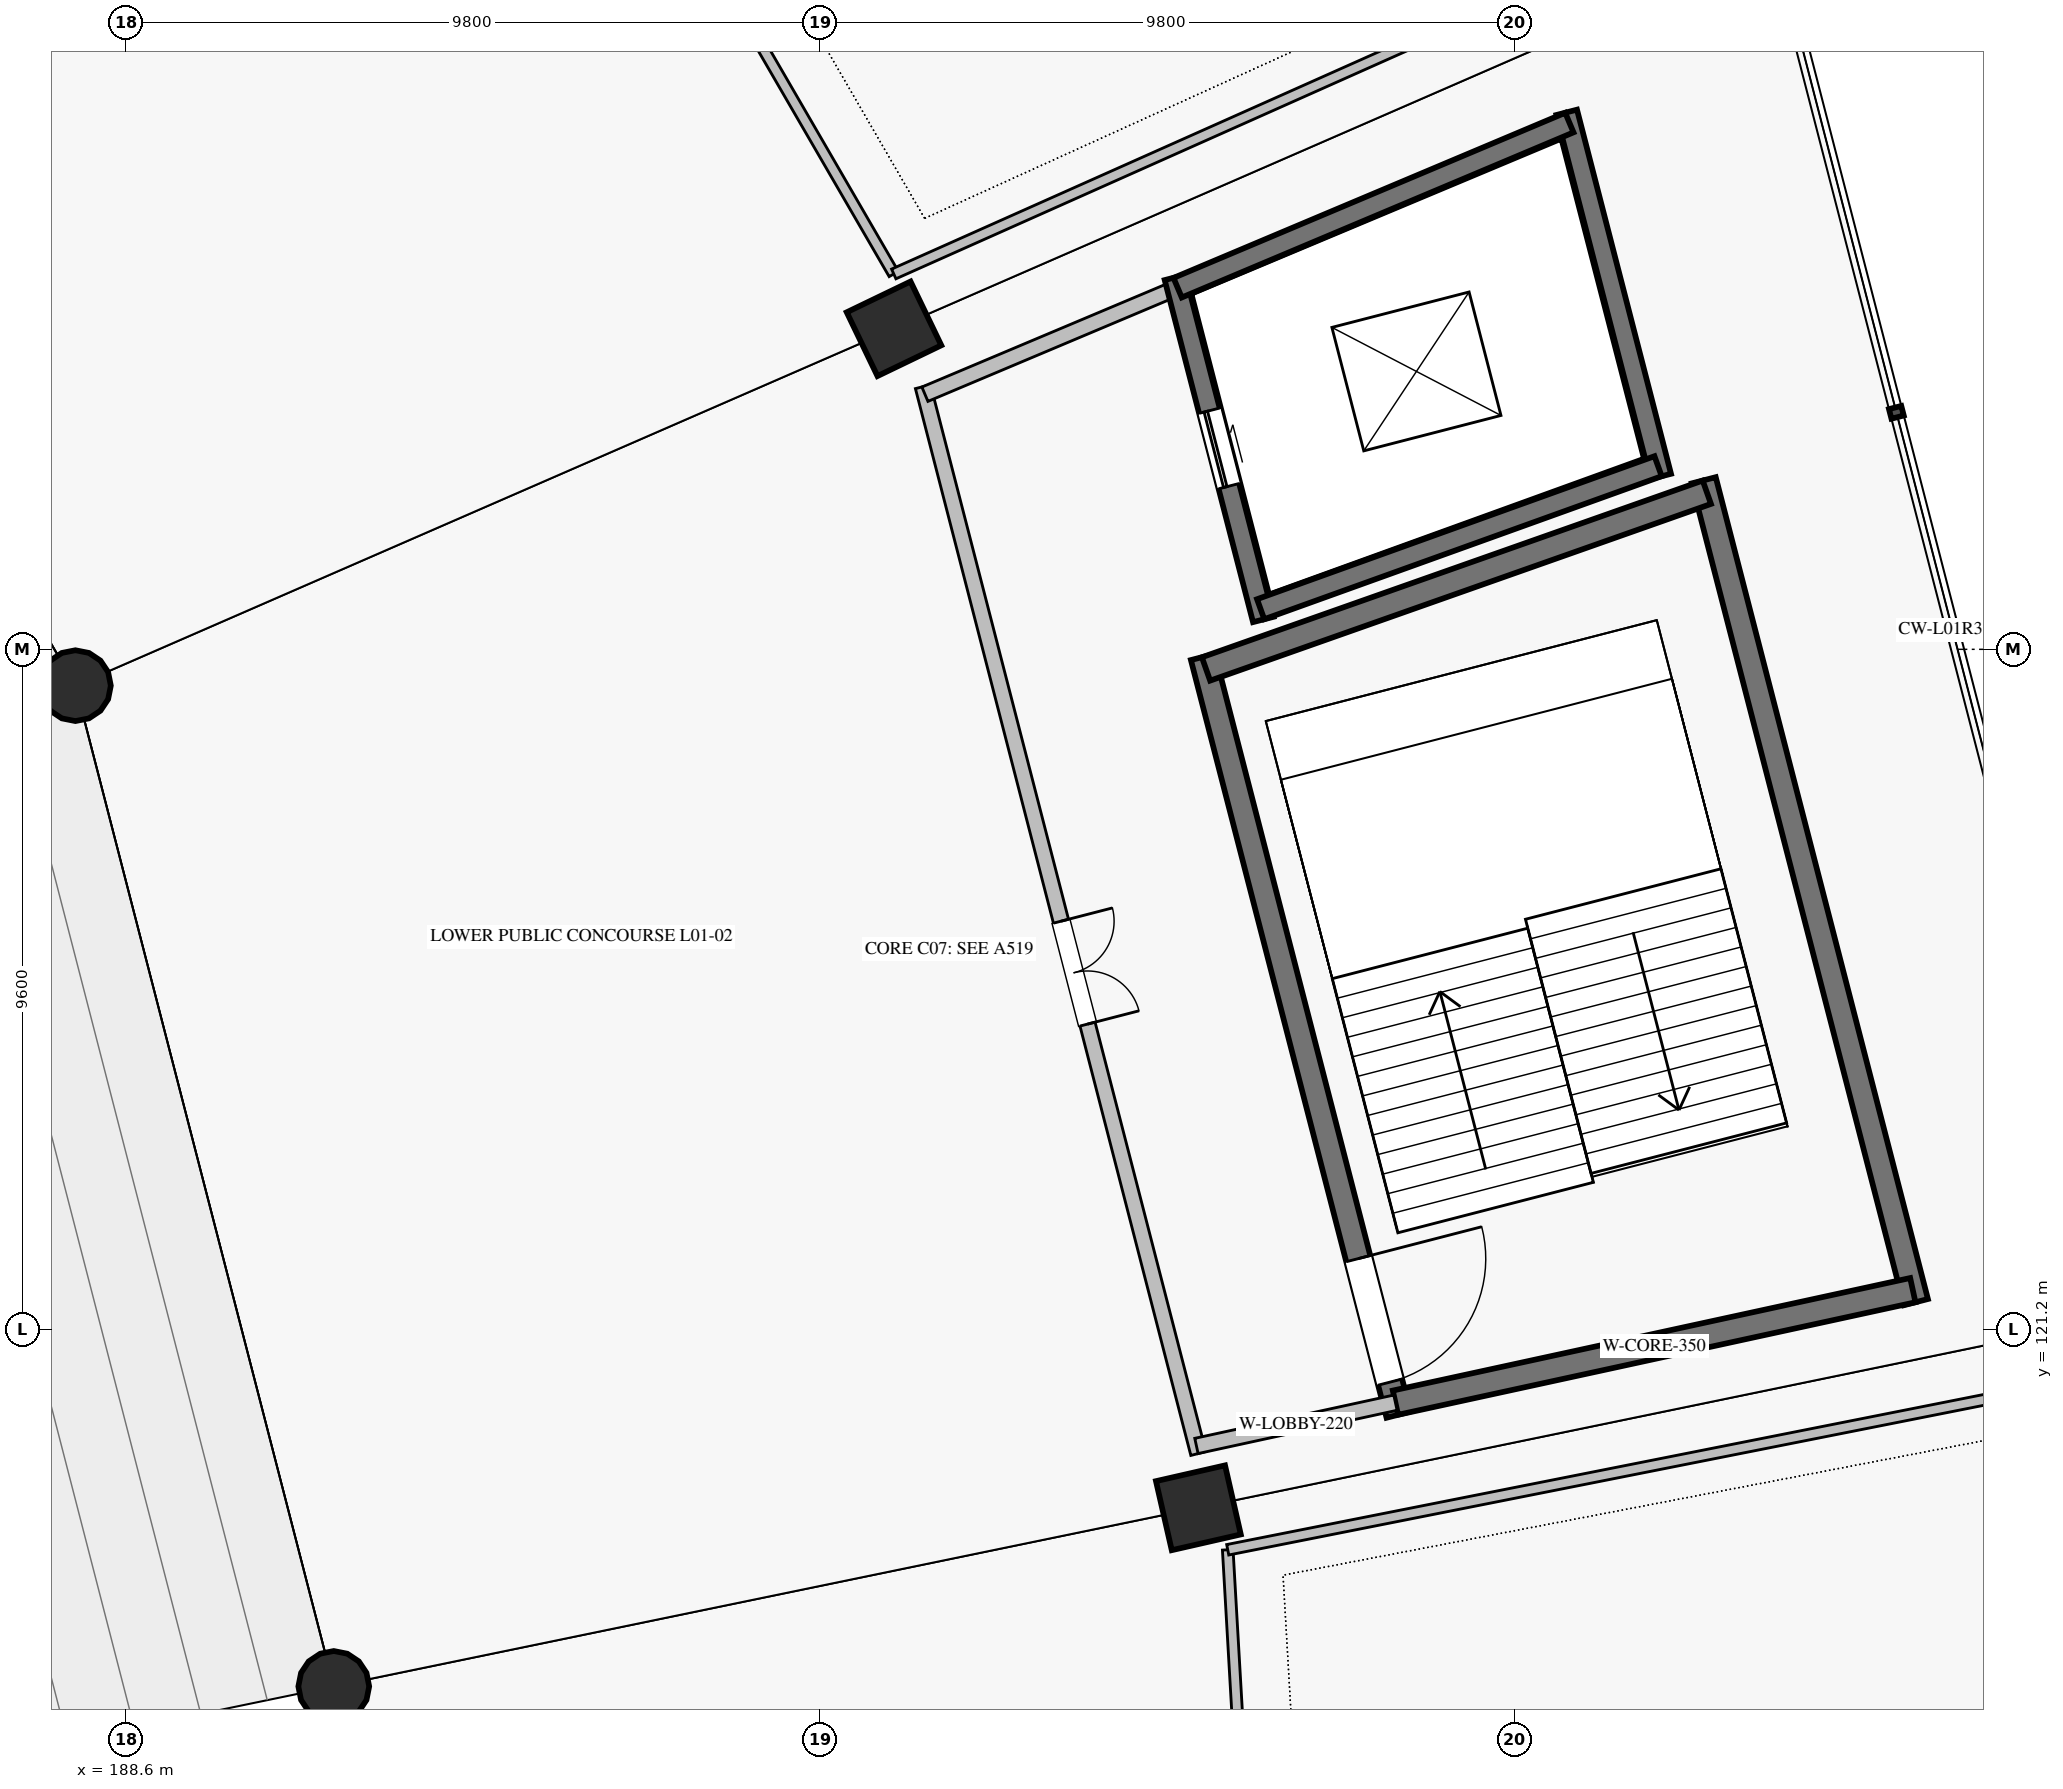
"""IFC4 building model, lengths in metres.
Left out: names, types, materials, properties, quantities, classifications, styles, units other than length and angle.
Written with IfcOpenShell. Run it as: python <this file> out.ifc"""

import sys

from ifc_helpers import new_model, si_unit, direction, frame, frame_2d, origin, origin_2d, place, context, subcontext, project, spatial, rectangle, circle, extrude, element, fill, save


model = new_model("IFC4")
c1 = context("Model", 3, precision=1e-05, world=origin(), true_north=direction((0.0, 1.0)))
c2 = subcontext(c1, "Body", "Model", "MODEL_VIEW")
j1 = project(units=[si_unit("LENGTHUNIT", "METRE"), si_unit("PLANEANGLEUNIT", "RADIAN")], contexts=[c1])
p1 = place(None, origin())
s1 = spatial("IfcSite", under=j1, at=p1, CompositionType="ELEMENT")
p2 = place(p1, origin())
s2 = spatial("IfcBuilding", under=s1, at=p2, CompositionType="ELEMENT")
p3 = place(p2, frame((0.0, 0.0, 5.78)))
s3 = spatial("IfcBuildingStorey", under=s2, at=p3, CompositionType="ELEMENT", Elevation=5.78)
for number, where, z_axis, x_axis in (
    (1, (191.533, 116.16, 0.0), (0.0, 0.0, 1.0), (0.975, 0.223, 0.0)),
    (2, (187.886, 130.287, 0.0), (0.0, 0.0, 1.0), (0.901, 0.434, 0.0)),
):
    element("IfcColumn", number, at=place(p3, frame(where, z_axis=z_axis, x_axis=x_axis)), inside=s3, PredefinedType="COLUMN", context=c2, shape_type="SweptSolid", body=[
        extrude(circle(Radius=0.5, at=origin_2d()), origin(), (0.0, 0.0, 1.0), 4.76),
    ])
for number, where, z_axis, x_axis in (
    (3, (203.738, 118.682, 0.0), (0.0, 0.0, 1.0), (0.975, 0.223, 0.0)),
    (4, (199.441, 135.325, 0.0), (0.0, 0.0, 1.0), (0.901, 0.434, 0.0)),
):
    element("IfcColumn", number, at=place(p3, frame(where, z_axis=z_axis, x_axis=x_axis)), inside=s3, PredefinedType="COLUMN", context=c2, shape_type="SweptSolid", body=[
        extrude(rectangle(XDim=1.0, YDim=1.0, at=origin_2d()), origin(), (0.0, 0.0, 1.0), 4.76),
    ])
p4 = place(p3, frame((206.562, 119.996, 0.0), z_axis=(0.0, 0.0, 1.0), x_axis=(-0.249959564539, 0.968256276042, 0.0)))
e5 = element("IfcWall", 5, at=p4, inside=s3, PredefinedType="SHEAR", context=c2, shape_type="SweptSolid", body=[
    extrude(rectangle(XDim=11.047, YDim=0.35, at=frame_2d((5.523, 0.0))), origin(), (0.0, 0.0, 1.0), 4.5),
])
p5 = place(p4, frame((0.475, 0.0, 0.0)))
e6 = element("IfcOpeningElement", 6, at=p5, cuts=e5, PredefinedType="OPENING", context=c2, shape_type="SweptSolid", body=[
    extrude(rectangle(XDim=1.8, YDim=2.2, at=frame_2d((0.9, 1.1))), frame((0.0, 0.185, 0.0), z_axis=(0.0, -1.0, 0.0), x_axis=(1.0, 0.0, 0.0)), (0.0, 0.0, 1.0), 0.37),
])
p6 = place(p3, frame((213.866, 121.585, 0.0), z_axis=(0.0, 0.0, 1.0), x_axis=(-0.249969221583, 0.968253782983, 0.0)))
e7 = element("IfcWall", 7, at=p6, inside=s3, PredefinedType="SHEAR", context=c2, shape_type="SweptSolid", body=[
    extrude(rectangle(XDim=11.982, YDim=0.35, at=frame_2d((5.991, 0.0))), origin(), (0.0, 0.0, 1.0), 4.5),
])
p7 = place(p3, frame((206.519, 120.166, 0.0), z_axis=(0.0, 0.0, 1.0), x_axis=(0.977149528138, 0.2125530514, 0.0)))
e8 = element("IfcWall", 8, at=p7, inside=s3, PredefinedType="SHEAR", context=c2, shape_type="SweptSolid", body=[
    extrude(rectangle(XDim=7.474, YDim=0.35, at=frame_2d((3.737, 0.0))), origin(), (0.0, 0.0, 1.0), 4.5),
])
p8 = place(p3, frame((203.845, 130.523, 0.0), z_axis=(0.0, 0.0, 1.0), x_axis=(0.943032412173, 0.332700871042, 0.0)))
e9 = element("IfcWall", 9, at=p8, inside=s3, PredefinedType="SHEAR", context=c2, shape_type="SweptSolid", body=[
    extrude(rectangle(XDim=7.497, YDim=0.35, at=frame_2d((3.748, 0.0))), origin(), (0.0, 0.0, 1.0), 4.5),
])
p9 = place(p3, frame((204.654, 131.221, 0.0), z_axis=(0.0, 0.0, 1.0), x_axis=(-0.250003862389, 0.968244839279, 0.0)))
e10 = element("IfcWall", 10, at=p9, inside=s3, PredefinedType="SHEAR", context=c2, shape_type="SweptSolid", body=[
    extrude(rectangle(XDim=4.987, YDim=0.3, at=frame_2d((2.494, 0.0))), origin(), (0.0, 0.0, 1.0), 4.5),
])
p10 = place(p9, frame((1.944, 0.0, 0.0)))
e11 = element("IfcOpeningElement", 11, at=p10, cuts=e10, PredefinedType="OPENING", context=c2, shape_type="SweptSolid", body=[
    extrude(rectangle(XDim=1.1, YDim=2.2, at=frame_2d((0.55, 1.1))), frame((0.0, 0.16, 0.0), z_axis=(0.0, -1.0, 0.0), x_axis=(1.0, 0.0, 0.0)), (0.0, 0.0, 1.0), 0.32),
])
p11 = place(p3, frame((210.264, 133.24, 0.0), z_axis=(0.0, 0.0, 1.0), x_axis=(-0.249961459705, 0.968255786795, 0.0)))
e12 = element("IfcWall", 12, at=p11, inside=s3, PredefinedType="SHEAR", context=c2, shape_type="SweptSolid", body=[
    extrude(rectangle(XDim=5.309, YDim=0.3, at=frame_2d((2.655, 0.0))), origin(), (0.0, 0.0, 1.0), 4.5),
])
p12 = place(p3, frame((204.616, 131.366, 0.0), z_axis=(0.0, 0.0, 1.0), x_axis=(0.940945340179, 0.338558513103, 0.0)))
e13 = element("IfcWall", 13, at=p12, inside=s3, PredefinedType="SHEAR", context=c2, shape_type="SweptSolid", body=[
    extrude(rectangle(XDim=5.962, YDim=0.3, at=frame_2d((2.981, 0.0))), origin(), (0.0, 0.0, 1.0), 4.5),
])
p13 = place(p3, frame((203.445, 135.905, 0.0), z_axis=(0.0, 0.0, 1.0), x_axis=(0.92149593043, 0.388388015007, 0.0)))
e14 = element("IfcWall", 14, at=p13, inside=s3, PredefinedType="SHEAR", context=c2, shape_type="SweptSolid", body=[
    extrude(rectangle(XDim=6.001, YDim=0.3, at=frame_2d((3.0, 0.0))), origin(), (0.0, 0.0, 1.0), 4.5),
])
p14 = place(p3, frame((203.737, 119.448, 0.0), z_axis=(0.0, 0.0, 1.0), x_axis=(-0.249963472505, 0.968255267176, 0.0)))
e15 = element("IfcWall", 15, at=p14, inside=s3, PredefinedType="SOLIDWALL", context=c2, shape_type="SweptSolid", body=[
    extrude(rectangle(XDim=15.553, YDim=0.22, at=frame_2d((7.776, 0.0))), origin(), (0.0, 0.0, 1.0), 3.448),
])
p15 = place(p14, frame((6.26, 0.0, 0.0)))
e16 = element("IfcOpeningElement", 16, at=p15, cuts=e15, PredefinedType="OPENING", context=c2, shape_type="SweptSolid", body=[
    extrude(rectangle(XDim=1.5, YDim=2.2, at=frame_2d((0.75, 1.1))), frame((0.0, 0.12, 0.0), z_axis=(0.0, -1.0, 0.0), x_axis=(1.0, 0.0, 0.0)), (0.0, 0.0, 1.0), 0.24),
])
p16 = place(p3, frame((203.71, 119.555, 0.0), z_axis=(0.0, 0.0, 1.0), x_axis=(0.977160263607, 0.212503692268, 0.0)))
e17 = element("IfcWall", 17, at=p16, inside=s3, PredefinedType="SOLIDWALL", context=c2, shape_type="SweptSolid", body=[
    extrude(rectangle(XDim=2.875, YDim=0.22, at=frame_2d((1.437, 0.0))), origin(), (0.0, 0.0, 1.0), 4.5),
])
p17 = place(p3, frame((199.877, 134.401, 0.0), z_axis=(0.0, 0.0, 1.0), x_axis=(0.921486922561, 0.388409386535, 0.0)))
e18 = element("IfcWall", 18, at=p17, inside=s3, PredefinedType="SOLIDWALL", context=c2, shape_type="SweptSolid", body=[
    extrude(rectangle(XDim=3.871, YDim=0.22, at=frame_2d((1.936, 0.0))), origin(), (0.0, 0.0, 1.0), 4.5),
])
p18 = place(p3, frame((205.041, 102.67, 0.0), z_axis=(0.0, 0.0, 1.0), x_axis=(-0.057603503798, 0.998339539611, 0.0)))
e19 = element("IfcWall", 19, at=p18, inside=s3, PredefinedType="PARTITIONING", context=c2, shape_type="SweptSolid", body=[
    extrude(rectangle(XDim=15.444, YDim=0.15, at=frame_2d((7.722, 0.0))), origin(), (0.0, 0.0, 1.0), 3.82),
])
p19 = place(p18, frame((7.047, 0.0, 0.0)))
e20 = element("IfcOpeningElement", 20, at=p19, cuts=e19, PredefinedType="OPENING", context=c2, shape_type="SweptSolid", body=[
    extrude(rectangle(XDim=1.35, YDim=2.15, at=frame_2d((0.675, 1.075))), frame((0.0, 0.085, 0.0), z_axis=(0.0, -1.0, 0.0), x_axis=(1.0, 0.0, 0.0)), (0.0, 0.0, 1.0), 0.17),
])
p20 = place(p3, frame((204.152, 118.089, 0.0), z_axis=(0.0, 0.0, 1.0), x_axis=(0.980904167784, 0.194491680088, 0.0)))
e21 = element("IfcWall", 21, at=p20, inside=s3, PredefinedType="PARTITIONING", context=c2, shape_type="SweptSolid", body=[
    extrude(rectangle(XDim=12.257, YDim=0.15, at=frame_2d((6.128, 0.0))), origin(), (0.0, 0.0, 1.0), 3.82),
])
p21 = place(p3, frame((199.438, 136.099, 0.0), z_axis=(0.0, 0.0, 1.0), x_axis=(-0.501617777052, 0.865089362867, 0.0)))
e22 = element("IfcWall", 22, at=p21, inside=s3, PredefinedType="PARTITIONING", context=c2, shape_type="SweptSolid", body=[
    extrude(rectangle(XDim=16.464, YDim=0.15, at=frame_2d((8.232, 0.0))), origin(), (0.0, 0.0, 1.0), 3.82),
])
p22 = place(p21, frame((7.642, 0.0, 0.0)))
e23 = element("IfcOpeningElement", 23, at=p22, cuts=e22, PredefinedType="OPENING", context=c2, shape_type="SweptSolid", body=[
    extrude(rectangle(XDim=1.18, YDim=2.15, at=frame_2d((0.59, 1.075))), frame((0.0, 0.085, 0.0), z_axis=(0.0, -1.0, 0.0), x_axis=(1.0, 0.0, 0.0)), (0.0, 0.0, 1.0), 0.17),
])
p23 = place(p3, frame((199.438, 136.099, 0.0), z_axis=(0.0, 0.0, 1.0), x_axis=(0.913245562849, 0.407409550621, 0.0)))
e24 = element("IfcWall", 24, at=p23, inside=s3, PredefinedType="PARTITIONING", context=c2, shape_type="SweptSolid", body=[
    extrude(rectangle(XDim=12.4, YDim=0.15, at=frame_2d((6.2, 0.0))), origin(), (0.0, 0.0, 1.0), 3.82),
])
p24 = place(p5, frame((1.8, 0.0, 0.0), z_axis=(0.0, 0.0, 1.0), x_axis=(-1.0, 0.0, 0.0)))
e25 = element("IfcDoor", 25, at=p24, inside=s3, OperationType="SINGLE_SWING_LEFT", PredefinedType="DOOR", context=c2, shape_type="SweptSolid", body=[
    extrude(rectangle(XDim=1.8, YDim=2.2, at=frame_2d((0.9, 1.1))), frame((0.0, 0.025, 0.0), z_axis=(0.0, -1.0, 0.0), x_axis=(1.0, 0.0, 0.0)), (0.0, 0.0, 1.0), 0.05),
])
fill(e6, e25)
p25 = place(p10, origin())
e26 = element("IfcDoor", 26, at=p25, inside=s3, OperationType="SLIDING_TO_RIGHT", PredefinedType="DOOR", context=c2, shape_type="SweptSolid", body=[
    extrude(rectangle(XDim=1.1, YDim=2.2, at=frame_2d((0.55, 1.1))), frame((0.0, 0.025, 0.0), z_axis=(0.0, -1.0, 0.0), x_axis=(1.0, 0.0, 0.0)), (0.0, 0.0, 1.0), 0.05),
])
fill(e11, e26)
p26 = place(p15, frame((1.5, 0.0, 0.0), z_axis=(0.0, 0.0, 1.0), x_axis=(-1.0, 0.0, 0.0)))
e27 = element("IfcDoor", 27, at=p26, inside=s3, OperationType="DOUBLE_DOOR_SINGLE_SWING", PredefinedType="DOOR", context=c2, shape_type="SweptSolid", body=[
    extrude(rectangle(XDim=1.5, YDim=2.2, at=frame_2d((0.75, 1.1))), frame((0.0, 0.025, 0.0), z_axis=(0.0, -1.0, 0.0), x_axis=(1.0, 0.0, 0.0)), (0.0, 0.0, 1.0), 0.05),
])
fill(e16, e27)
save(model, sys.argv[1])
